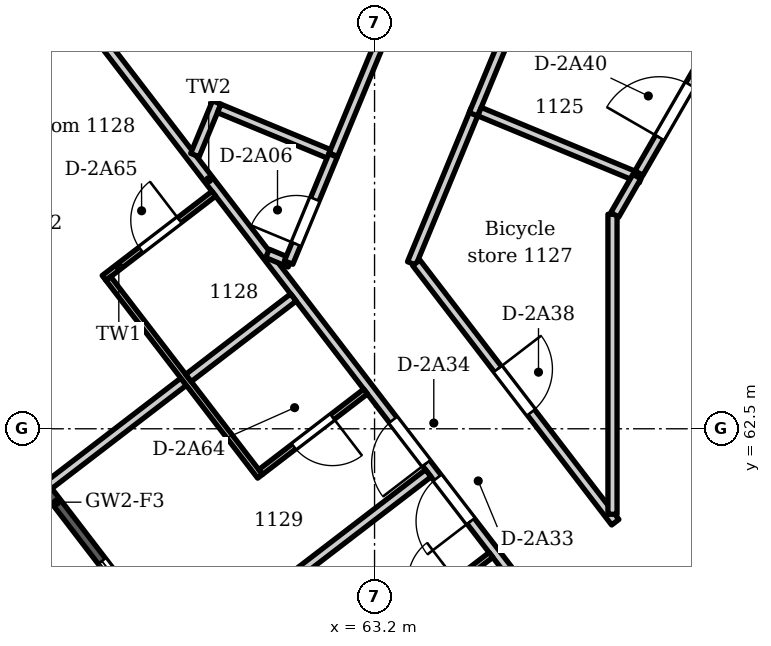
"""IFC4 building model, lengths in metres.
Left out: names, types, materials, properties, quantities, classifications, styles, units other than length and angle.
Written with IfcOpenShell. Run it as: python <this file> out.ifc"""

import sys

from ifc_helpers import new_model, si_unit, direction, frame, frame_2d, origin, place, context, subcontext, project, spatial, polyline, rectangle, outline, extrude, element, fill, save


model = new_model("IFC4")
c1 = context("Model", 3, precision=1e-05, world=origin(), true_north=direction((0.0, 1.0)))
c2 = subcontext(c1, "Body", "Model", "MODEL_VIEW")
j1 = project(units=[si_unit("LENGTHUNIT", "METRE"), si_unit("PLANEANGLEUNIT", "RADIAN")], contexts=[c1])
p1 = place(None, origin())
s1 = spatial("IfcSite", under=j1, at=p1, CompositionType="ELEMENT")
p2 = place(p1, origin())
s2 = spatial("IfcBuilding", under=s1, at=p2, CompositionType="ELEMENT")
p3 = place(p2, frame((0.0, 0.0, 50.4)))
s3 = spatial("IfcBuildingStorey", under=s2, at=p3, CompositionType="ELEMENT", Elevation=50.4)
p4 = place(p3, frame((79.969, 32.624, 0.0), z_axis=(0.0, 0.0, 1.0), x_axis=(-0.608761526367, 0.793353265585, 0.0)))
e1 = element("IfcWall", 1, at=p4, inside=s3, PredefinedType="SOLIDWALL", context=c2, shape_type="SweptSolid", body=[
    extrude(outline(polyline([(0.149, 0.075), (0.149, -0.075), (47.217, -0.075), (47.217, 0.075), (0.149, 0.075)])), origin(), (0.0, 0.0, 1.0), 3.3),
])
p5 = place(p4, frame((1.222, 0.0, 0.0)))
e2 = element("IfcOpeningElement", 2, at=p5, cuts=e1, PredefinedType="OPENING", context=c2, shape_type="SweptSolid", body=[
    extrude(rectangle(XDim=1.8, YDim=2.6, at=frame_2d((0.9, 1.3))), frame((0.0, 0.085, 0.0), z_axis=(0.0, -1.0, 0.0), x_axis=(1.0, 0.0, 0.0)), (0.0, 0.0, 1.0), 0.17),
])
p6 = place(p4, frame((4.565, 0.0, 0.0)))
e3 = element("IfcOpeningElement", 3, at=p6, cuts=e1, PredefinedType="OPENING", context=c2, shape_type="SweptSolid", body=[
    extrude(rectangle(XDim=1.8, YDim=2.6, at=frame_2d((0.9, 1.3))), frame((0.0, 0.085, 0.0), z_axis=(0.0, -1.0, 0.0), x_axis=(1.0, 0.0, 0.0)), (0.0, 0.0, 1.0), 0.17),
])
p7 = place(p4, frame((8.209, 0.0, 0.0)))
e4 = element("IfcOpeningElement", 4, at=p7, cuts=e1, PredefinedType="OPENING", context=c2, shape_type="SweptSolid", body=[
    extrude(rectangle(XDim=1.8, YDim=2.6, at=frame_2d((0.9, 1.3))), frame((0.0, 0.085, 0.0), z_axis=(0.0, -1.0, 0.0), x_axis=(1.0, 0.0, 0.0)), (0.0, 0.0, 1.0), 0.17),
])
p8 = place(p4, frame((12.453, 0.0, 0.0)))
e5 = element("IfcOpeningElement", 5, at=p8, cuts=e1, PredefinedType="OPENING", context=c2, shape_type="SweptSolid", body=[
    extrude(rectangle(XDim=1.8, YDim=2.6, at=frame_2d((0.9, 1.3))), frame((0.0, 0.085, 0.0), z_axis=(0.0, -1.0, 0.0), x_axis=(1.0, 0.0, 0.0)), (0.0, 0.0, 1.0), 0.17),
])
p9 = place(p4, frame((15.496, 0.0, 0.0)))
e6 = element("IfcOpeningElement", 6, at=p9, cuts=e1, PredefinedType="OPENING", context=c2, shape_type="SweptSolid", body=[
    extrude(rectangle(XDim=1.8, YDim=2.6, at=frame_2d((0.9, 1.3))), frame((0.0, 0.085, 0.0), z_axis=(0.0, -1.0, 0.0), x_axis=(1.0, 0.0, 0.0)), (0.0, 0.0, 1.0), 0.17),
])
p10 = place(p4, frame((18.84, 0.0, 0.15)))
e7 = element("IfcOpeningElement", 7, at=p10, cuts=e1, PredefinedType="OPENING", context=c2, shape_type="SweptSolid", body=[
    extrude(rectangle(XDim=2.4, YDim=2.45, at=frame_2d((1.2, 1.225))), frame((0.0, 0.085, 0.0), z_axis=(0.0, -1.0, 0.0), x_axis=(1.0, 0.0, 0.0)), (0.0, 0.0, 1.0), 0.17),
])
p11 = place(p4, frame((22.783, 0.0, 0.0)))
e8 = element("IfcOpeningElement", 8, at=p11, cuts=e1, PredefinedType="OPENING", context=c2, shape_type="SweptSolid", body=[
    extrude(rectangle(XDim=1.8, YDim=2.6, at=frame_2d((0.9, 1.3))), frame((0.0, 0.085, 0.0), z_axis=(0.0, -1.0, 0.0), x_axis=(1.0, 0.0, 0.0)), (0.0, 0.0, 1.0), 0.17),
])
p12 = place(p4, frame((26.127, 0.0, 0.15)))
e9 = element("IfcOpeningElement", 9, at=p12, cuts=e1, PredefinedType="OPENING", context=c2, shape_type="SweptSolid", body=[
    extrude(rectangle(XDim=2.4, YDim=2.45, at=frame_2d((1.2, 1.225))), frame((0.0, 0.085, 0.0), z_axis=(0.0, -1.0, 0.0), x_axis=(1.0, 0.0, 0.0)), (0.0, 0.0, 1.0), 0.17),
])
p13 = place(p4, frame((30.071, 0.0, 0.0)))
e10 = element("IfcOpeningElement", 10, at=p13, cuts=e1, PredefinedType="OPENING", context=c2, shape_type="SweptSolid", body=[
    extrude(rectangle(XDim=1.8, YDim=2.6, at=frame_2d((0.9, 1.3))), frame((0.0, 0.085, 0.0), z_axis=(0.0, -1.0, 0.0), x_axis=(1.0, 0.0, 0.0)), (0.0, 0.0, 1.0), 0.17),
])
p14 = place(p4, frame((33.114, 0.0, 0.0)))
e11 = element("IfcOpeningElement", 11, at=p14, cuts=e1, PredefinedType="OPENING", context=c2, shape_type="SweptSolid", body=[
    extrude(rectangle(XDim=1.8, YDim=2.6, at=frame_2d((0.9, 1.3))), frame((0.0, 0.085, 0.0), z_axis=(0.0, -1.0, 0.0), x_axis=(1.0, 0.0, 0.0)), (0.0, 0.0, 1.0), 0.17),
])
p15 = place(p4, frame((37.358, 0.0, 0.0)))
e12 = element("IfcOpeningElement", 12, at=p15, cuts=e1, PredefinedType="OPENING", context=c2, shape_type="SweptSolid", body=[
    extrude(rectangle(XDim=1.8, YDim=2.6, at=frame_2d((0.9, 1.3))), frame((0.0, 0.085, 0.0), z_axis=(0.0, -1.0, 0.0), x_axis=(1.0, 0.0, 0.0)), (0.0, 0.0, 1.0), 0.17),
])
p16 = place(p4, frame((41.001, 0.0, 0.0)))
e13 = element("IfcOpeningElement", 13, at=p16, cuts=e1, PredefinedType="OPENING", context=c2, shape_type="SweptSolid", body=[
    extrude(rectangle(XDim=1.8, YDim=2.6, at=frame_2d((0.9, 1.3))), frame((0.0, 0.085, 0.0), z_axis=(0.0, -1.0, 0.0), x_axis=(1.0, 0.0, 0.0)), (0.0, 0.0, 1.0), 0.17),
])
p17 = place(p4, frame((44.345, 0.0, 0.0)))
e14 = element("IfcOpeningElement", 14, at=p17, cuts=e1, PredefinedType="OPENING", context=c2, shape_type="SweptSolid", body=[
    extrude(rectangle(XDim=1.8, YDim=2.6, at=frame_2d((0.9, 1.3))), frame((0.0, 0.085, 0.0), z_axis=(0.0, -1.0, 0.0), x_axis=(1.0, 0.0, 0.0)), (0.0, 0.0, 1.0), 0.17),
])
p18 = place(p3, frame((57.534, 70.427, 0.0), z_axis=(0.0, 0.0, 1.0), x_axis=(0.608794371867, -0.793328061261, 0.0)))
e15 = element("IfcWall", 15, at=p18, inside=s3, PredefinedType="PARTITIONING", context=c2, shape_type="SweptSolid", body=[
    extrude(rectangle(XDim=19.759, YDim=0.15, at=frame_2d((9.88, 0.0))), origin(), (0.0, 0.0, 1.0), 3.3),
])
p19 = place(p18, frame((18.293, 0.0, 0.0)))
e16 = element("IfcOpeningElement", 16, at=p19, cuts=e15, PredefinedType="OPENING", context=c2, shape_type="SweptSolid", body=[
    extrude(rectangle(XDim=0.9, YDim=2.1, at=frame_2d((0.45, 1.05))), frame((0.0, 0.085, 0.0), z_axis=(0.0, -1.0, 0.0), x_axis=(1.0, 0.0, 0.0)), (0.0, 0.0, 1.0), 0.17),
])
p20 = place(p18, frame((17.093, 0.0, 0.0)))
e17 = element("IfcOpeningElement", 17, at=p20, cuts=e15, PredefinedType="OPENING", context=c2, shape_type="SweptSolid", body=[
    extrude(rectangle(XDim=0.9, YDim=2.1, at=frame_2d((0.45, 1.05))), frame((0.0, 0.085, 0.0), z_axis=(0.0, -1.0, 0.0), x_axis=(1.0, 0.0, 0.0)), (0.0, 0.0, 1.0), 0.17),
])
p21 = place(p18, frame((11.006, 0.0, 0.0)))
e18 = element("IfcOpeningElement", 18, at=p21, cuts=e15, PredefinedType="OPENING", context=c2, shape_type="SweptSolid", body=[
    extrude(rectangle(XDim=0.9, YDim=2.1, at=frame_2d((0.45, 1.05))), frame((0.0, 0.085, 0.0), z_axis=(0.0, -1.0, 0.0), x_axis=(1.0, 0.0, 0.0)), (0.0, 0.0, 1.0), 0.17),
])
p22 = place(p18, frame((9.806, 0.0, 0.0)))
e19 = element("IfcOpeningElement", 19, at=p22, cuts=e15, PredefinedType="OPENING", context=c2, shape_type="SweptSolid", body=[
    extrude(rectangle(XDim=0.9, YDim=2.1, at=frame_2d((0.45, 1.05))), frame((0.0, 0.085, 0.0), z_axis=(0.0, -1.0, 0.0), x_axis=(1.0, 0.0, 0.0)), (0.0, 0.0, 1.0), 0.17),
])
p23 = place(p3, frame((57.848, 61.576, 0.0), z_axis=(0.0, 0.0, 1.0), x_axis=(0.793280814045, 0.608855935397, 0.0)))
e20 = element("IfcWall", 20, at=p23, inside=s3, PredefinedType="PARTITIONING", context=c2, shape_type="SweptSolid", body=[
    extrude(rectangle(XDim=2.789, YDim=0.15, at=frame_2d((1.395, 0.0))), origin(), (0.0, 0.0, 1.0), 3.3),
])
p24 = place(p3, frame((58.751, 64.981, 0.0), z_axis=(0.0, 0.0, 1.0), x_axis=(0.793437070432, 0.608652294224, 0.0)))
e21 = element("IfcWall", 21, at=p24, inside=s3, PredefinedType="PARTITIONING", context=c2, shape_type="SweptSolid", body=[
    extrude(rectangle(XDim=2.275, YDim=0.1, at=frame_2d((1.138, 0.0))), origin(), (0.0, 0.0, 1.0), 3.3),
])
p25 = place(p24, frame((0.762, 0.0, 0.0)))
e22 = element("IfcOpeningElement", 22, at=p25, cuts=e21, PredefinedType="OPENING", context=c2, shape_type="SweptSolid", body=[
    extrude(rectangle(XDim=0.8, YDim=2.1, at=frame_2d((0.4, 1.05))), frame((0.0, 0.06, 0.0), z_axis=(0.0, -1.0, 0.0), x_axis=(1.0, 0.0, 0.0)), (0.0, 0.0, 1.0), 0.12),
])
p26 = place(p3, frame((58.821, 64.971, 0.0), z_axis=(0.0, 0.0, 1.0), x_axis=(0.608766496324, -0.793349451978, 0.0)))
e23 = element("IfcWall", 23, at=p26, inside=s3, PredefinedType="PARTITIONING", context=c2, shape_type="SweptSolid", body=[
    extrude(rectangle(XDim=4.1, YDim=0.1, at=frame_2d((2.05, 0.0))), origin(), (0.0, 0.0, 1.0), 3.3),
])
p27 = place(p3, frame((60.066, 58.686, 0.0), z_axis=(0.0, 0.0, 1.0), x_axis=(0.793444149255, 0.608643066184, 0.0)))
e24 = element("IfcWall", 24, at=p27, inside=s3, PredefinedType="PARTITIONING", context=c2, shape_type="SweptSolid", body=[
    extrude(rectangle(XDim=5.064, YDim=0.15, at=frame_2d((2.532, 0.0))), origin(), (0.0, 0.0, 1.0), 3.3),
])
p28 = place(p3, frame((60.14, 63.335, 0.0), z_axis=(0.0, 0.0, 1.0), x_axis=(0.79342025342, 0.608674216197, 0.0)))
e25 = element("IfcWall", 25, at=p28, inside=s3, PredefinedType="PARTITIONING", context=c2, shape_type="SweptSolid", body=[
    extrude(rectangle(XDim=2.175, YDim=0.15, at=frame_2d((1.088, 0.0))), origin(), (0.0, 0.0, 1.0), 3.3),
])
p29 = place(p3, frame((60.246, 67.0, 0.0), z_axis=(0.0, 0.0, 1.0), x_axis=(0.383080061035, 0.923715143774, 0.0)))
e26 = element("IfcWall", 26, at=p29, inside=s3, PredefinedType="PARTITIONING", context=c2, shape_type="SweptSolid", body=[
    extrude(rectangle(XDim=0.938, YDim=0.15, at=frame_2d((0.469, 0.0))), origin(), (0.0, 0.0, 1.0), 3.3),
])
p30 = place(p3, frame((60.645, 67.768, 0.0), z_axis=(0.0, 0.0, 1.0), x_axis=(0.923799320148, -0.382877024767, 0.0)))
e27 = element("IfcWall", 27, at=p30, inside=s3, PredefinedType="PARTITIONING", context=c2, shape_type="SweptSolid", body=[
    extrude(rectangle(XDim=2.025, YDim=0.15, at=frame_2d((1.013, 0.0))), origin(), (0.0, 0.0, 1.0), 3.3),
])
p31 = place(p3, frame((61.327, 61.788, 0.0), z_axis=(0.0, 0.0, 1.0), x_axis=(0.79342025342, 0.608674216197, 0.0)))
e28 = element("IfcWall", 28, at=p31, inside=s3, PredefinedType="PARTITIONING", context=c2, shape_type="SweptSolid", body=[
    extrude(rectangle(XDim=2.175, YDim=0.1, at=frame_2d((1.088, 0.0))), origin(), (0.0, 0.0, 1.0), 3.3),
])
p32 = place(p31, frame((0.688, 0.0, 0.0)))
e29 = element("IfcOpeningElement", 29, at=p32, cuts=e28, PredefinedType="OPENING", context=c2, shape_type="SweptSolid", body=[
    extrude(rectangle(XDim=0.8, YDim=2.1, at=frame_2d((0.4, 1.05))), frame((0.0, 0.06, 0.0), z_axis=(0.0, -1.0, 0.0), x_axis=(1.0, 0.0, 0.0)), (0.0, 0.0, 1.0), 0.12),
])
p33 = place(p3, frame((61.439, 65.383, 0.0), z_axis=(0.0, 0.0, 1.0), x_axis=(0.923599819829, -0.383358021714, 0.0)))
e30 = element("IfcWall", 30, at=p33, inside=s3, PredefinedType="PARTITIONING", context=c2, shape_type="SweptSolid", body=[
    extrude(rectangle(XDim=0.4, YDim=0.15, at=frame_2d((0.2, 0.0))), origin(), (0.0, 0.0, 1.0), 3.3),
])
p34 = place(p3, frame((61.787, 65.234, 0.0), z_axis=(0.0, 0.0, 1.0), x_axis=(0.38314285934, 0.923689097769, 0.0)))
e31 = element("IfcWall", 31, at=p34, inside=s3, PredefinedType="PARTITIONING", context=c2, shape_type="SweptSolid", body=[
    extrude(rectangle(XDim=1.908, YDim=0.15, at=frame_2d((0.954, 0.0))), origin(), (0.0, 0.0, 1.0), 3.3),
])
p35 = place(p34, frame((0.328, 0.0, 0.0)))
e32 = element("IfcOpeningElement", 32, at=p35, cuts=e31, PredefinedType="OPENING", context=c2, shape_type="SweptSolid", body=[
    extrude(rectangle(XDim=0.8, YDim=2.1, at=frame_2d((0.4, 1.05))), frame((0.0, 0.085, 0.0), z_axis=(0.0, -1.0, 0.0), x_axis=(1.0, 0.0, 0.0)), (0.0, 0.0, 1.0), 0.17),
])
p36 = place(p3, frame((62.522, 67.007, 0.0), z_axis=(0.0, 0.0, 1.0), x_axis=(0.382650715136, 0.923893083753, 0.0)))
e33 = element("IfcWall", 33, at=p36, inside=s3, PredefinedType="PARTITIONING", context=c2, shape_type="SweptSolid", body=[
    extrude(rectangle(XDim=5.049, YDim=0.15, at=frame_2d((2.525, 0.0))), origin(), (0.0, 0.0, 1.0), 2.75),
])
p37 = place(p36, frame((3.014, 0.0, 0.0)))
e34 = element("IfcOpeningElement", 34, at=p37, cuts=e33, PredefinedType="OPENING", context=c2, shape_type="SweptSolid", body=[
    extrude(rectangle(XDim=1.8, YDim=2.1, at=frame_2d((0.9, 1.05))), frame((0.0, 0.085, 0.0), z_axis=(0.0, -1.0, 0.0), x_axis=(1.0, 0.0, 0.0)), (0.0, 0.0, 1.0), 0.17),
])
p38 = place(p3, frame((63.309, 59.041, 0.0), z_axis=(0.0, 0.0, 1.0), x_axis=(0.793437070432, 0.608652294224, 0.0)))
e35 = element("IfcWall", 35, at=p38, inside=s3, PredefinedType="PARTITIONING", context=c2, shape_type="SweptSolid", body=[
    extrude(rectangle(XDim=2.275, YDim=0.1, at=frame_2d((1.138, 0.0))), origin(), (0.0, 0.0, 1.0), 3.3),
])
p39 = place(p38, frame((0.762, 0.0, 0.0)))
e36 = element("IfcOpeningElement", 36, at=p39, cuts=e35, PredefinedType="OPENING", context=c2, shape_type="SweptSolid", body=[
    extrude(rectangle(XDim=0.8, YDim=2.1, at=frame_2d((0.4, 1.05))), frame((0.0, 0.06, 0.0), z_axis=(0.0, -1.0, 0.0), x_axis=(1.0, 0.0, 0.0)), (0.0, 0.0, 1.0), 0.12),
])
p40 = place(p3, frame((63.811, 65.22, 0.0), z_axis=(0.0, 0.0, 1.0), x_axis=(0.382485754441, 0.923961388614, 0.0)))
e37 = element("IfcWall", 37, at=p40, inside=s3, PredefinedType="PARTITIONING", context=c2, shape_type="SweptSolid", body=[
    extrude(rectangle(XDim=2.736, YDim=0.15, at=frame_2d((1.368, 0.0))), origin(), (0.0, 0.0, 1.0), 3.3),
])
p41 = place(p3, frame((63.886, 65.229, 0.0), z_axis=(0.0, 0.0, 1.0), x_axis=(0.608696503356, -0.793403155276, 0.0)))
e38 = element("IfcWall", 38, at=p41, inside=s3, PredefinedType="PARTITIONING", context=c2, shape_type="SweptSolid", body=[
    extrude(rectangle(XDim=5.377, YDim=0.15, at=frame_2d((2.688, 0.0))), origin(), (0.0, 0.0, 1.0), 3.3),
])
p42 = place(p41, frame((2.201, 0.0, 0.0)))
e39 = element("IfcOpeningElement", 39, at=p42, cuts=e38, PredefinedType="OPENING", context=c2, shape_type="SweptSolid", body=[
    extrude(rectangle(XDim=0.9, YDim=2.1, at=frame_2d((0.45, 1.05))), frame((0.0, 0.085, 0.0), z_axis=(0.0, -1.0, 0.0), x_axis=(1.0, 0.0, 0.0)), (0.0, 0.0, 1.0), 0.17),
])
p43 = place(p3, frame((64.826, 67.672, 0.0), z_axis=(0.0, 0.0, 1.0), x_axis=(0.382785873713, 0.923837093261, 0.0)))
e40 = element("IfcWall", 40, at=p43, inside=s3, PredefinedType="PARTITIONING", context=c2, shape_type="SweptSolid", body=[
    extrude(rectangle(XDim=2.484, YDim=0.15, at=frame_2d((1.242, 0.0))), origin(), (0.0, 0.0, 1.0), 2.75),
])
p44 = place(p3, frame((64.926, 67.715, 0.0), z_axis=(0.0, 0.0, 1.0), x_axis=(0.923886418472, -0.382666807761, 0.0)))
e41 = element("IfcWall", 41, at=p44, inside=s3, PredefinedType="PARTITIONING", context=c2, shape_type="SweptSolid", body=[
    extrude(rectangle(XDim=2.875, YDim=0.15, at=frame_2d((1.438, 0.0))), origin(), (0.0, 0.0, 1.0), 3.3),
])
p45 = place(p3, frame((67.113, 61.094, 0.0), z_axis=(0.0, 0.0, 1.0), x_axis=(0.0, 1.0, 0.0)))
e42 = element("IfcWall", 42, at=p45, inside=s3, PredefinedType="PARTITIONING", context=c2, shape_type="SweptSolid", body=[
    extrude(rectangle(XDim=4.934, YDim=0.15, at=frame_2d((2.467, 0.0))), origin(), (0.0, 0.0, 1.0), 3.3),
])
p46 = place(p3, frame((67.15, 66.018, 0.0), z_axis=(0.0, 0.0, 1.0), x_axis=(0.499858068882, 0.866107332248, 0.0)))
e43 = element("IfcWall", 43, at=p46, inside=s3, PredefinedType="PARTITIONING", context=c2, shape_type="SweptSolid", body=[
    extrude(rectangle(XDim=0.727, YDim=0.15, at=frame_2d((0.364, 0.0))), origin(), (0.0, 0.0, 1.0), 3.3),
])
p47 = place(p3, frame((67.548, 66.705, 0.0), z_axis=(0.0, 0.0, 1.0), x_axis=(0.500075472253, 0.865981825474, 0.0)))
e44 = element("IfcWall", 44, at=p47, inside=s3, PredefinedType="PARTITIONING", context=c2, shape_type="SweptSolid", body=[
    extrude(rectangle(XDim=2.355, YDim=0.15, at=frame_2d((1.177, 0.0))), origin(), (0.0, 0.0, 1.0), 2.75),
])
p48 = place(p47, frame((0.676, 0.0, 0.0)))
e45 = element("IfcOpeningElement", 45, at=p48, cuts=e44, PredefinedType="OPENING", context=c2, shape_type="SweptSolid", body=[
    extrude(rectangle(XDim=1.0, YDim=2.1, at=frame_2d((0.5, 1.05))), frame((0.0, 0.085, 0.0), z_axis=(0.0, -1.0, 0.0), x_axis=(1.0, 0.0, 0.0)), (0.0, 0.0, 1.0), 0.17),
])
p49 = place(p14, origin())
e46 = element("IfcDoor", 46, at=p49, inside=s3, OperationType="SLIDING_TO_LEFT", PredefinedType="DOOR", context=c2, shape_type="SweptSolid", body=[
    extrude(rectangle(XDim=1.8, YDim=2.6, at=frame_2d((0.9, 1.3))), frame((0.0, 0.025, 0.0), z_axis=(0.0, -1.0, 0.0), x_axis=(1.0, 0.0, 0.0)), (0.0, 0.0, 1.0), 0.05),
])
fill(e11, e46)
p50 = place(p35, origin())
e47 = element("IfcDoor", 47, at=p50, inside=s3, OperationType="SINGLE_SWING_LEFT", PredefinedType="DOOR", context=c2, shape_type="SweptSolid", body=[
    extrude(rectangle(XDim=0.8, YDim=2.1, at=frame_2d((0.4, 1.05))), frame((0.0, 0.025, 0.0), z_axis=(0.0, -1.0, 0.0), x_axis=(1.0, 0.0, 0.0)), (0.0, 0.0, 1.0), 0.05),
])
fill(e32, e47)
p51 = place(p21, frame((0.9, 0.0, 0.0), z_axis=(0.0, 0.0, 1.0), x_axis=(-1.0, 0.0, 0.0)))
e48 = element("IfcDoor", 48, at=p51, inside=s3, OperationType="SINGLE_SWING_LEFT", PredefinedType="DOOR", context=c2, shape_type="SweptSolid", body=[
    extrude(rectangle(XDim=0.9, YDim=2.1, at=frame_2d((0.45, 1.05))), frame((0.0, 0.025, 0.0), z_axis=(0.0, -1.0, 0.0), x_axis=(1.0, 0.0, 0.0)), (0.0, 0.0, 1.0), 0.05),
])
fill(e18, e48)
p52 = place(p22, frame((0.9, 0.0, 0.0), z_axis=(0.0, 0.0, 1.0), x_axis=(-1.0, 0.0, 0.0)))
e49 = element("IfcDoor", 49, at=p52, inside=s3, OperationType="SINGLE_SWING_LEFT", PredefinedType="DOOR", context=c2, shape_type="SweptSolid", body=[
    extrude(rectangle(XDim=0.9, YDim=2.1, at=frame_2d((0.45, 1.05))), frame((0.0, 0.025, 0.0), z_axis=(0.0, -1.0, 0.0), x_axis=(1.0, 0.0, 0.0)), (0.0, 0.0, 1.0), 0.05),
])
fill(e19, e49)
p53 = place(p42, origin())
e50 = element("IfcDoor", 50, at=p53, inside=s3, OperationType="SINGLE_SWING_LEFT", PredefinedType="DOOR", context=c2, shape_type="SweptSolid", body=[
    extrude(rectangle(XDim=0.9, YDim=2.1, at=frame_2d((0.45, 1.05))), frame((0.0, 0.025, 0.0), z_axis=(0.0, -1.0, 0.0), x_axis=(1.0, 0.0, 0.0)), (0.0, 0.0, 1.0), 0.05),
])
fill(e39, e50)
p54 = place(p48, origin())
e51 = element("IfcDoor", 51, at=p54, inside=s3, OperationType="SINGLE_SWING_LEFT", PredefinedType="DOOR", context=c2, shape_type="SweptSolid", body=[
    extrude(rectangle(XDim=1.0, YDim=2.1, at=frame_2d((0.5, 1.05))), frame((0.0, 0.025, 0.0), z_axis=(0.0, -1.0, 0.0), x_axis=(1.0, 0.0, 0.0)), (0.0, 0.0, 1.0), 0.05),
])
fill(e45, e51)
p55 = place(p32, frame((0.8, 0.0, 0.0), z_axis=(0.0, 0.0, 1.0), x_axis=(-1.0, 0.0, 0.0)))
e52 = element("IfcDoor", 52, at=p55, inside=s3, OperationType="SINGLE_SWING_LEFT", PredefinedType="DOOR", context=c2, shape_type="SweptSolid", body=[
    extrude(rectangle(XDim=0.8, YDim=2.1, at=frame_2d((0.4, 1.05))), frame((0.0, 0.025, 0.0), z_axis=(0.0, -1.0, 0.0), x_axis=(1.0, 0.0, 0.0)), (0.0, 0.0, 1.0), 0.05),
])
fill(e29, e52)
p56 = place(p25, origin())
e53 = element("IfcDoor", 53, at=p56, inside=s3, OperationType="SINGLE_SWING_RIGHT", PredefinedType="DOOR", context=c2, shape_type="SweptSolid", body=[
    extrude(rectangle(XDim=0.8, YDim=2.1, at=frame_2d((0.4, 1.05))), frame((0.0, 0.025, 0.0), z_axis=(0.0, -1.0, 0.0), x_axis=(1.0, 0.0, 0.0)), (0.0, 0.0, 1.0), 0.05),
])
fill(e22, e53)
save(model, sys.argv[1])
